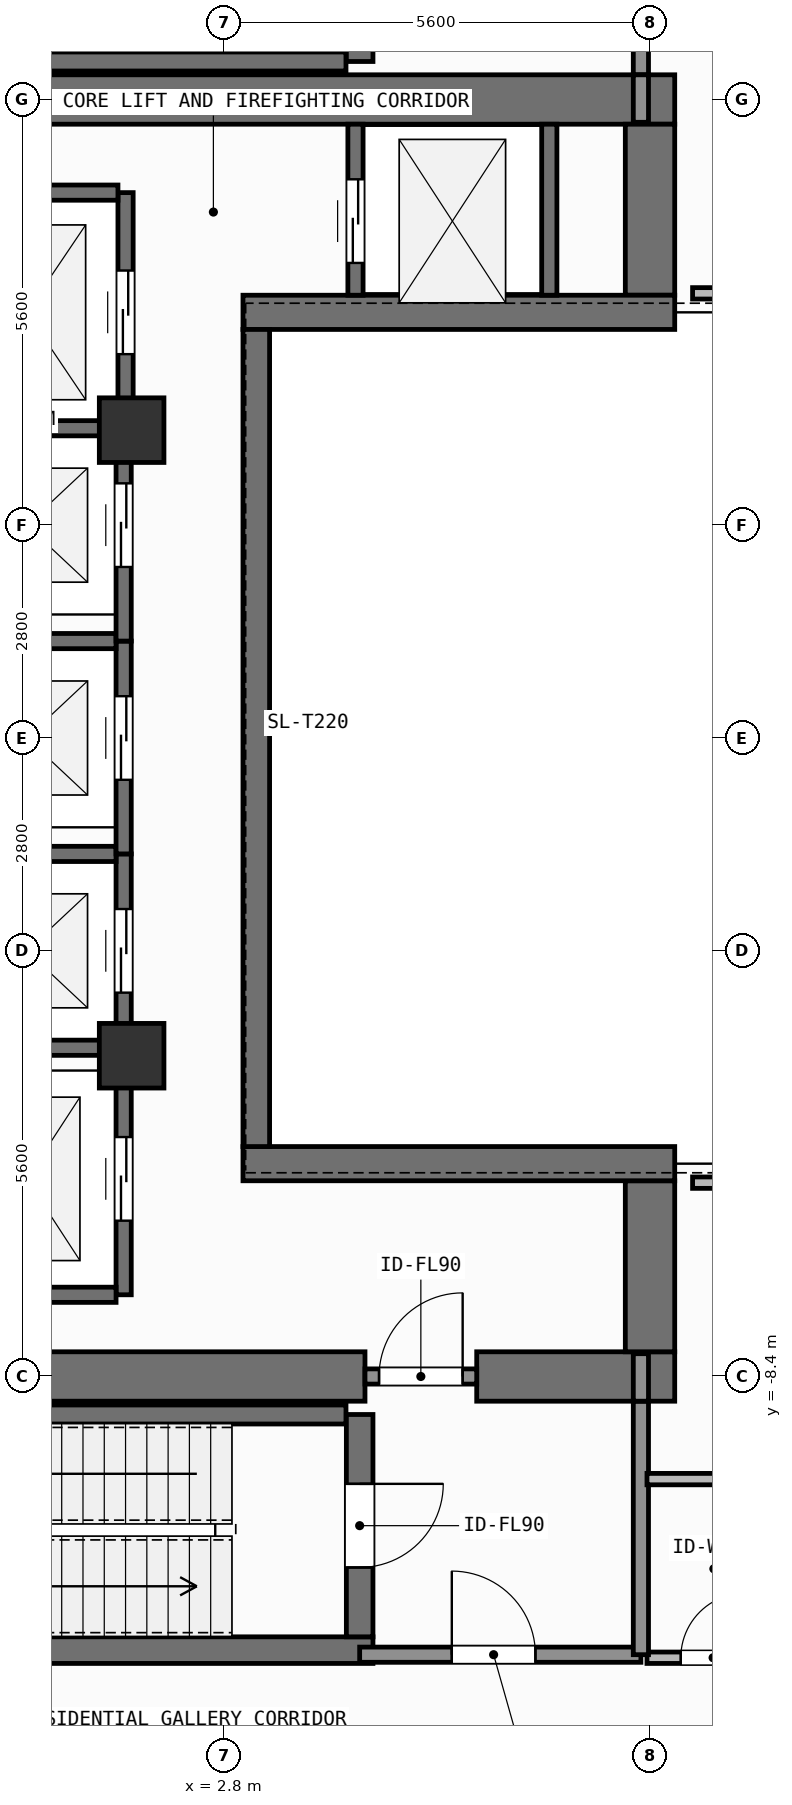
"""IFC4 building model, lengths in metres.
Left out: names, types, materials, properties, quantities, classifications, styles, units other than length and angle.
Written with IfcOpenShell. Run it as: python <this file> out.ifc"""

import sys

from ifc_helpers import new_model, si_unit, direction, frame, frame_2d, origin, origin_2d, place, context, subcontext, project, spatial, rectangle, extrude, element, fill, save


model = new_model("IFC4")
c1 = context("Model", 3, precision=1e-05, world=origin(), true_north=direction((0.0, 1.0)))
c2 = subcontext(c1, "Body", "Model", "MODEL_VIEW")
j1 = project(units=[si_unit("LENGTHUNIT", "METRE"), si_unit("PLANEANGLEUNIT", "RADIAN")], contexts=[c1])
p1 = place(None, origin())
s1 = spatial("IfcSite", under=j1, at=p1, CompositionType="ELEMENT")
p2 = place(p1, origin())
s2 = spatial("IfcBuilding", under=s1, at=p2, CompositionType="ELEMENT")
p3 = place(p2, frame((0.0, 0.0, 282.0)))
s3 = spatial("IfcBuildingStorey", under=s2, at=p3, CompositionType="ELEMENT", Elevation=282.0)
p4 = place(p3, frame((-2.62, -8.4, 0.0), z_axis=(0.0, 0.0, 1.0), x_axis=(1.0, 0.0, 0.0)))
e1 = element("IfcWall", 1, at=p4, inside=s3, PredefinedType="SHEAR", context=c2, shape_type="SweptSolid", body=[
    extrude(rectangle(XDim=7.27, YDim=0.65, at=frame_2d((3.635, 0.0))), origin(), (0.0, 0.0, 1.0), 3.9),
])
p5 = place(p3, frame((6.12, -8.4, 0.0), z_axis=(0.0, 0.0, 1.0), x_axis=(1.0, 0.0, 0.0)))
e2 = element("IfcWall", 2, at=p5, inside=s3, PredefinedType="SHEAR", context=c2, shape_type="SweptSolid", body=[
    extrude(rectangle(XDim=2.605, YDim=0.65, at=frame_2d((1.302, 0.0))), origin(), (0.0, 0.0, 1.0), 3.9),
])
p6 = place(p3, frame((-7.55, 8.4, 0.0), z_axis=(0.0, 0.0, 1.0), x_axis=(1.0, 0.0, 0.0)))
e3 = element("IfcWall", 3, at=p6, inside=s3, PredefinedType="SHEAR", context=c2, shape_type="SweptSolid", body=[
    extrude(rectangle(XDim=16.275, YDim=0.65, at=frame_2d((8.138, 0.0))), origin(), (0.0, 0.0, 1.0), 3.9),
])
for number, where, z_axis, x_axis in (
    (4, (8.4, -8.075, 0.0), (0.0, 0.0, 1.0), (0.0, 1.0, 0.0)),
    (5, (8.4, 5.825, 0.0), (0.0, 0.0, 1.0), (0.0, 1.0, 0.0)),
):
    element("IfcWall", number, at=place(p3, frame(where, z_axis=z_axis, x_axis=x_axis)), inside=s3, PredefinedType="SHEAR", context=c2, shape_type="SweptSolid", body=[
        extrude(rectangle(XDim=2.25, YDim=0.65, at=frame_2d((1.125, 0.0))), origin(), (0.0, 0.0, 1.0), 3.9),
    ])
for number, where, z_axis, x_axis in (
    (6, (3.045, -5.6, 0.0), (0.0, 0.0, 1.0), (1.0, 0.0, 0.0)),
    (7, (3.045, 5.6, 0.0), (0.0, 0.0, 1.0), (1.0, 0.0, 0.0)),
):
    element("IfcWall", number, at=place(p3, frame(where, z_axis=z_axis, x_axis=x_axis)), inside=s3, PredefinedType="SHEAR", context=c2, shape_type="SweptSolid", body=[
        extrude(rectangle(XDim=5.68, YDim=0.45, at=frame_2d((2.84, 0.0))), origin(), (0.0, 0.0, 1.0), 3.9),
    ])
p7 = place(p3, frame((3.22, -5.375, 0.0), z_axis=(0.0, 0.0, 1.0), x_axis=(0.0, 1.0, 0.0)))
e8 = element("IfcWall", 8, at=p7, inside=s3, PredefinedType="SHEAR", context=c2, shape_type="SweptSolid", body=[
    extrude(rectangle(XDim=10.75, YDim=0.35, at=frame_2d((5.375, 0.0))), origin(), (0.0, 0.0, 1.0), 3.9),
])
p8 = place(p3, frame((-2.555, -12.0, 0.0), z_axis=(0.0, 0.0, 1.0), x_axis=(1.0, 0.0, 0.0)))
e9 = element("IfcWall", 9, at=p8, inside=s3, PredefinedType="SHEAR", context=c2, shape_type="SweptSolid", body=[
    extrude(rectangle(XDim=7.31, YDim=0.35, at=frame_2d((3.655, 0.0))), origin(), (0.0, 0.0, 1.0), 3.9),
])
p9 = place(p3, frame((-2.2, -8.9, 0.0), z_axis=(0.0, 0.0, 1.0), x_axis=(1.0, 0.0, 0.0)))
e10 = element("IfcWall", 10, at=p9, inside=s3, PredefinedType="SHEAR", context=c2, shape_type="SweptSolid", body=[
    extrude(rectangle(XDim=6.6, YDim=0.25, at=frame_2d((3.3, 0.0))), origin(), (0.0, 0.0, 1.0), 3.9),
])
p10 = place(p3, frame((4.58, -8.9, 0.0), z_axis=(0.0, 0.0, 1.0), x_axis=(0.0, -1.0, 0.0)))
e11 = element("IfcWall", 11, at=p10, inside=s3, PredefinedType="SHEAR", context=c2, shape_type="SweptSolid", body=[
    extrude(rectangle(XDim=2.925, YDim=0.35, at=frame_2d((1.462, 0.0))), origin(), (0.0, 0.0, 1.0), 3.9),
])
p11 = place(p10, frame((0.913, 0.0, 0.0)))
e12 = element("IfcOpeningElement", 12, at=p11, cuts=e11, PredefinedType="OPENING", context=c2, shape_type="SweptSolid", body=[
    extrude(rectangle(XDim=1.1, YDim=2.15, at=frame_2d((0.55, 1.075))), frame((0.0, 0.185, 0.0), z_axis=(0.0, -1.0, 0.0), x_axis=(1.0, 0.0, 0.0)), (0.0, 0.0, 1.0), 0.37),
])
p12 = place(p3, frame((-2.2, 8.9, 0.0), z_axis=(0.0, 0.0, 1.0), x_axis=(1.0, 0.0, 0.0)))
e13 = element("IfcWall", 13, at=p12, inside=s3, PredefinedType="SHEAR", context=c2, shape_type="SweptSolid", body=[
    extrude(rectangle(XDim=6.6, YDim=0.25, at=frame_2d((3.3, 0.0))), origin(), (0.0, 0.0, 1.0), 3.9),
])
p13 = place(p3, frame((4.58, 11.825, 0.0), z_axis=(0.0, 0.0, 1.0), x_axis=(0.0, -1.0, 0.0)))
e14 = element("IfcWall", 14, at=p13, inside=s3, PredefinedType="SHEAR", context=c2, shape_type="SweptSolid", body=[
    extrude(rectangle(XDim=2.925, YDim=0.35, at=frame_2d((1.462, 0.0))), origin(), (0.0, 0.0, 1.0), 3.9),
])
p14 = place(p13, frame((0.913, 0.0, 0.0)))
e15 = element("IfcOpeningElement", 15, at=p14, cuts=e14, PredefinedType="OPENING", context=c2, shape_type="SweptSolid", body=[
    extrude(rectangle(XDim=1.1, YDim=2.15, at=frame_2d((0.55, 1.075))), frame((0.0, 0.185, 0.0), z_axis=(0.0, -1.0, 0.0), x_axis=(1.0, 0.0, 0.0)), (0.0, 0.0, 1.0), 0.37),
])
for number, where, z_axis, x_axis in (
    (16, (1.58, -4.18, 0.0), (0.0, 0.0, 1.0), (1.0, 0.0, 0.0)),
    (17, (1.58, 4.05, 0.0), (0.0, 0.0, 1.0), (1.0, 0.0, 0.0)),
):
    element("IfcColumn", number, at=place(p3, frame(where, z_axis=z_axis, x_axis=x_axis)), inside=s3, PredefinedType="COLUMN", context=c2, shape_type="SweptSolid", body=[
        extrude(rectangle(XDim=0.85, YDim=0.85, at=origin_2d()), origin(), (0.0, 0.0, 1.0), 3.9),
    ])
p15 = place(p3, frame((1.475, -4.275, 0.0), z_axis=(0.0, 0.0, 1.0), x_axis=(0.0, 1.0, 0.0)))
e18 = element("IfcWall", 18, at=p15, inside=s3, PredefinedType="SHEAR", context=c2, shape_type="SweptSolid", body=[
    extrude(rectangle(XDim=2.75, YDim=0.2, at=frame_2d((1.375, 0.0))), origin(), (0.0, 0.0, 1.0), 3.62),
])
p16 = place(p15, frame((0.925, 0.0, 0.0)))
e19 = element("IfcOpeningElement", 19, at=p16, cuts=e18, PredefinedType="OPENING", context=c2, shape_type="SweptSolid", body=[
    extrude(rectangle(XDim=1.1, YDim=2.2, at=frame_2d((0.55, 1.1))), frame((0.0, 0.11, 0.0), z_axis=(0.0, -1.0, 0.0), x_axis=(1.0, 0.0, 0.0)), (0.0, 0.0, 1.0), 0.22),
])
for number, where, z_axis, x_axis in (
    (20, (-0.975, -4.075, 0.0), (0.0, 0.0, 1.0), (1.0, 0.0, 0.0)),
    (21, (-0.975, -1.525, 0.0), (0.0, 0.0, 1.0), (1.0, 0.0, 0.0)),
):
    element("IfcWall", number, at=place(p3, frame(where, z_axis=z_axis, x_axis=x_axis)), inside=s3, PredefinedType="SHEAR", context=c2, shape_type="SweptSolid", body=[
        extrude(rectangle(XDim=2.35, YDim=0.2, at=frame_2d((1.175, 0.0))), origin(), (0.0, 0.0, 1.0), 3.62),
    ])
p17 = place(p3, frame((1.475, -1.525, 0.0), z_axis=(0.0, 0.0, 1.0), x_axis=(0.0, 1.0, 0.0)))
e22 = element("IfcWall", 22, at=p17, inside=s3, PredefinedType="SHEAR", context=c2, shape_type="SweptSolid", body=[
    extrude(rectangle(XDim=2.8, YDim=0.2, at=frame_2d((1.4, 0.0))), origin(), (0.0, 0.0, 1.0), 3.62),
])
p18 = place(p17, frame((0.975, 0.0, 0.0)))
e23 = element("IfcOpeningElement", 23, at=p18, cuts=e22, PredefinedType="OPENING", context=c2, shape_type="SweptSolid", body=[
    extrude(rectangle(XDim=1.1, YDim=2.2, at=frame_2d((0.55, 1.1))), frame((0.0, 0.11, 0.0), z_axis=(0.0, -1.0, 0.0), x_axis=(1.0, 0.0, 0.0)), (0.0, 0.0, 1.0), 0.22),
])
p19 = place(p3, frame((-0.975, 1.275, 0.0), z_axis=(0.0, 0.0, 1.0), x_axis=(1.0, 0.0, 0.0)))
e24 = element("IfcWall", 24, at=p19, inside=s3, PredefinedType="SHEAR", context=c2, shape_type="SweptSolid", body=[
    extrude(rectangle(XDim=2.35, YDim=0.2, at=frame_2d((1.175, 0.0))), origin(), (0.0, 0.0, 1.0), 3.62),
])
p20 = place(p3, frame((1.475, 1.275, 0.0), z_axis=(0.0, 0.0, 1.0), x_axis=(0.0, 1.0, 0.0)))
e25 = element("IfcWall", 25, at=p20, inside=s3, PredefinedType="SHEAR", context=c2, shape_type="SweptSolid", body=[
    extrude(rectangle(XDim=2.8, YDim=0.2, at=frame_2d((1.4, 0.0))), origin(), (0.0, 0.0, 1.0), 3.62),
])
p21 = place(p20, frame((0.975, 0.0, 0.0)))
e26 = element("IfcOpeningElement", 26, at=p21, cuts=e25, PredefinedType="OPENING", context=c2, shape_type="SweptSolid", body=[
    extrude(rectangle(XDim=1.1, YDim=2.2, at=frame_2d((0.55, 1.1))), frame((0.0, 0.11, 0.0), z_axis=(0.0, -1.0, 0.0), x_axis=(1.0, 0.0, 0.0)), (0.0, 0.0, 1.0), 0.22),
])
p22 = place(p3, frame((-0.975, 4.075, 0.0), z_axis=(0.0, 0.0, 1.0), x_axis=(1.0, 0.0, 0.0)))
e27 = element("IfcWall", 27, at=p22, inside=s3, PredefinedType="SHEAR", context=c2, shape_type="SweptSolid", body=[
    extrude(rectangle(XDim=2.35, YDim=0.2, at=frame_2d((1.175, 0.0))), origin(), (0.0, 0.0, 1.0), 3.62),
])
p23 = place(p3, frame((1.5, 4.025, 0.0), z_axis=(0.0, 0.0, 1.0), x_axis=(0.0, 1.0, 0.0)))
e28 = element("IfcWall", 28, at=p23, inside=s3, PredefinedType="SHEAR", context=c2, shape_type="SweptSolid", body=[
    extrude(rectangle(XDim=3.15, YDim=0.2, at=frame_2d((1.575, 0.0))), origin(), (0.0, 0.0, 1.0), 3.62),
])
p24 = place(p23, frame((1.025, 0.0, 0.0)))
e29 = element("IfcOpeningElement", 29, at=p24, cuts=e28, PredefinedType="OPENING", context=c2, shape_type="SweptSolid", body=[
    extrude(rectangle(XDim=1.1, YDim=2.2, at=frame_2d((0.55, 1.1))), frame((0.0, 0.11, 0.0), z_axis=(0.0, -1.0, 0.0), x_axis=(1.0, 0.0, 0.0)), (0.0, 0.0, 1.0), 0.22),
])
p25 = place(p3, frame((-1.0, 7.175, 0.0), z_axis=(0.0, 0.0, 1.0), x_axis=(1.0, 0.0, 0.0)))
e30 = element("IfcWall", 30, at=p25, inside=s3, PredefinedType="SHEAR", context=c2, shape_type="SweptSolid", body=[
    extrude(rectangle(XDim=2.4, YDim=0.2, at=frame_2d((1.2, 0.0))), origin(), (0.0, 0.0, 1.0), 3.62),
])
p26 = place(p3, frame((1.475, -7.325, 0.0), z_axis=(0.0, 0.0, 1.0), x_axis=(0.0, 1.0, 0.0)))
e31 = element("IfcWall", 31, at=p26, inside=s3, PredefinedType="SHEAR", context=c2, shape_type="SweptSolid", body=[
    extrude(rectangle(XDim=3.05, YDim=0.2, at=frame_2d((1.525, 0.0))), origin(), (0.0, 0.0, 1.0), 3.62),
])
p27 = place(p26, frame((0.975, 0.0, 0.0)))
e32 = element("IfcOpeningElement", 32, at=p27, cuts=e31, PredefinedType="OPENING", context=c2, shape_type="SweptSolid", body=[
    extrude(rectangle(XDim=1.1, YDim=2.2, at=frame_2d((0.55, 1.1))), frame((0.0, 0.11, 0.0), z_axis=(0.0, -1.0, 0.0), x_axis=(1.0, 0.0, 0.0)), (0.0, 0.0, 1.0), 0.22),
])
p28 = place(p3, frame((-0.975, -7.325, 0.0), z_axis=(0.0, 0.0, 1.0), x_axis=(1.0, 0.0, 0.0)))
e33 = element("IfcWall", 33, at=p28, inside=s3, PredefinedType="SHEAR", context=c2, shape_type="SweptSolid", body=[
    extrude(rectangle(XDim=2.35, YDim=0.2, at=frame_2d((1.175, 0.0))), origin(), (0.0, 0.0, 1.0), 3.62),
])
p29 = place(p3, frame((4.525, 5.825, 0.0), z_axis=(0.0, 0.0, 1.0), x_axis=(0.0, 1.0, 0.0)))
e34 = element("IfcWall", 34, at=p29, inside=s3, PredefinedType="SHEAR", context=c2, shape_type="SweptSolid", body=[
    extrude(rectangle(XDim=2.25, YDim=0.2, at=frame_2d((1.125, 0.0))), origin(), (0.0, 0.0, 1.0), 3.62),
])
p30 = place(p29, frame((0.425, 0.0, 0.0)))
e35 = element("IfcOpeningElement", 35, at=p30, cuts=e34, PredefinedType="OPENING", context=c2, shape_type="SweptSolid", body=[
    extrude(rectangle(XDim=1.1, YDim=2.2, at=frame_2d((0.55, 1.1))), frame((0.0, 0.11, 0.0), z_axis=(0.0, -1.0, 0.0), x_axis=(1.0, 0.0, 0.0)), (0.0, 0.0, 1.0), 0.22),
])
p31 = place(p3, frame((7.075, 5.825, 0.0), z_axis=(0.0, 0.0, 1.0), x_axis=(0.0, 1.0, 0.0)))
e36 = element("IfcWall", 36, at=p31, inside=s3, PredefinedType="SHEAR", context=c2, shape_type="SweptSolid", body=[
    extrude(rectangle(XDim=2.25, YDim=0.2, at=frame_2d((1.125, 0.0))), origin(), (0.0, 0.0, 1.0), 3.62),
])
p32 = place(p3, frame((4.58, -12.06, 0.0), z_axis=(0.0, 0.0, 1.0), x_axis=(1.0, 0.0, 0.0)))
e37 = element("IfcWall", 37, at=p32, inside=s3, PredefinedType="SOLIDWALL", context=c2, shape_type="SweptSolid", body=[
    extrude(rectangle(XDim=3.7, YDim=0.2, at=frame_2d((1.85, 0.0))), origin(), (0.0, 0.0, 1.0), 3.62),
])
p33 = place(p32, frame((1.212, 0.0, 0.0)))
e38 = element("IfcOpeningElement", 38, at=p33, cuts=e37, PredefinedType="OPENING", context=c2, shape_type="SweptSolid", body=[
    extrude(rectangle(XDim=1.1, YDim=2.15, at=frame_2d((0.55, 1.075))), frame((0.0, 0.11, 0.0), z_axis=(0.0, -1.0, 0.0), x_axis=(1.0, 0.0, 0.0)), (0.0, 0.0, 1.0), 0.22),
])
p34 = place(p3, frame((4.65, -8.4, 0.0), z_axis=(0.0, 0.0, 1.0), x_axis=(1.0, 0.0, 0.0)))
e39 = element("IfcWall", 39, at=p34, inside=s3, PredefinedType="SOLIDWALL", context=c2, shape_type="SweptSolid", body=[
    extrude(rectangle(XDim=1.47, YDim=0.2, at=frame_2d((0.735, 0.0))), origin(), (0.0, 0.0, 1.0), 2.86),
])
p35 = place(p34, frame((0.185, 0.0, 0.0)))
e40 = element("IfcOpeningElement", 40, at=p35, cuts=e39, PredefinedType="OPENING", context=c2, shape_type="SweptSolid", body=[
    extrude(rectangle(XDim=1.1, YDim=2.15, at=frame_2d((0.55, 1.075))), frame((0.0, 0.11, 0.0), z_axis=(0.0, -1.0, 0.0), x_axis=(1.0, 0.0, 0.0)), (0.0, 0.0, 1.0), 0.22),
])
p36 = place(p3, frame((8.36, -12.1, 0.0), z_axis=(0.0, 0.0, 1.0), x_axis=(1.0, 0.0, 0.0)))
e41 = element("IfcWall", 41, at=p36, inside=s3, PredefinedType="PARTITIONING", context=c2, shape_type="SweptSolid", body=[
    extrude(rectangle(XDim=1.74, YDim=0.15, at=frame_2d((0.87, 0.0))), origin(), (0.0, 0.0, 1.0), 3.62),
])
p37 = place(p36, frame((0.445, 0.0, 0.0)))
e42 = element("IfcOpeningElement", 42, at=p37, cuts=e41, PredefinedType="OPENING", context=c2, shape_type="SweptSolid", body=[
    extrude(rectangle(XDim=0.85, YDim=2.1, at=frame_2d((0.425, 1.05))), frame((0.0, 0.085, 0.0), z_axis=(0.0, -1.0, 0.0), x_axis=(1.0, 0.0, 0.0)), (0.0, 0.0, 1.0), 0.17),
])
for number, where, z_axis, x_axis in (
    (43, (8.28, -12.06, 0.0), (0.0, 0.0, 1.0), (0.0, 1.0, 0.0)),
    (44, (8.28, 8.725, 0.0), (0.0, 0.0, 1.0), (0.0, 1.0, 0.0)),
):
    element("IfcWall", number, at=place(p3, frame(where, z_axis=z_axis, x_axis=x_axis)), inside=s3, PredefinedType="SOLIDWALL", context=c2, shape_type="SweptSolid", body=[
        extrude(rectangle(XDim=3.335, YDim=0.2, at=frame_2d((1.667, 0.0))), origin(), (0.0, 0.0, 1.0), 3.62),
    ])
p38 = place(p3, frame((8.28, -8.725, 0.0), z_axis=(0.0, 0.0, 1.0), x_axis=(0.0, 1.0, 0.0)))
e45 = element("IfcWall", 45, at=p38, inside=s3, PredefinedType="SOLIDWALL", context=c2, shape_type="SweptSolid", body=[
    extrude(rectangle(XDim=0.625, YDim=0.2, at=frame_2d((0.312, 0.0))), origin(), (0.0, 0.0, 1.0), 3.62),
])
p39 = place(p3, frame((8.36, -9.75, 0.0), z_axis=(0.0, 0.0, 1.0), x_axis=(1.0, 0.0, 0.0)))
e46 = element("IfcWall", 46, at=p39, inside=s3, PredefinedType="PARTITIONING", context=c2, shape_type="SweptSolid", body=[
    extrude(rectangle(XDim=1.74, YDim=0.15, at=frame_2d((0.87, 0.0))), origin(), (0.0, 0.0, 1.0), 3.62),
])
p40 = place(p3, frame((8.96, -5.85, 0.0), z_axis=(0.0, 0.0, 1.0), x_axis=(1.0, 0.0, 0.0)))
e47 = element("IfcWall", 47, at=p40, inside=s3, PredefinedType="PARTITIONING", context=c2, shape_type="SweptSolid", body=[
    extrude(rectangle(XDim=6.62, YDim=0.15, at=frame_2d((3.31, 0.0))), origin(), (0.0, 0.0, 1.0), 3.62),
])
p41 = place(p3, frame((8.28, 8.1, 0.0), z_axis=(0.0, 0.0, 1.0), x_axis=(0.0, 1.0, 0.0)))
e48 = element("IfcWall", 48, at=p41, inside=s3, PredefinedType="SOLIDWALL", context=c2, shape_type="SweptSolid", body=[
    extrude(rectangle(XDim=0.625, YDim=0.2, at=frame_2d((0.312, 0.0))), origin(), (0.0, 0.0, 1.0), 3.62),
])
p42 = place(p3, frame((8.96, 5.85, 0.0), z_axis=(0.0, 0.0, 1.0), x_axis=(1.0, 0.0, 0.0)))
e49 = element("IfcWall", 49, at=p42, inside=s3, PredefinedType="PARTITIONING", context=c2, shape_type="SweptSolid", body=[
    extrude(rectangle(XDim=6.62, YDim=0.15, at=frame_2d((3.31, 0.0))), origin(), (0.0, 0.0, 1.0), 3.62),
])
p43 = place(p16, origin())
e50 = element("IfcDoor", 50, at=p43, inside=s3, OperationType="SLIDING_TO_LEFT", PredefinedType="DOOR", context=c2, shape_type="SweptSolid", body=[
    extrude(rectangle(XDim=1.1, YDim=2.2, at=frame_2d((0.55, 1.1))), frame((0.0, 0.025, 0.0), z_axis=(0.0, -1.0, 0.0), x_axis=(1.0, 0.0, 0.0)), (0.0, 0.0, 1.0), 0.05),
])
fill(e19, e50)
p44 = place(p18, origin())
e51 = element("IfcDoor", 51, at=p44, inside=s3, OperationType="SLIDING_TO_LEFT", PredefinedType="DOOR", context=c2, shape_type="SweptSolid", body=[
    extrude(rectangle(XDim=1.1, YDim=2.2, at=frame_2d((0.55, 1.1))), frame((0.0, 0.025, 0.0), z_axis=(0.0, -1.0, 0.0), x_axis=(1.0, 0.0, 0.0)), (0.0, 0.0, 1.0), 0.05),
])
fill(e23, e51)
p45 = place(p21, origin())
e52 = element("IfcDoor", 52, at=p45, inside=s3, OperationType="SLIDING_TO_LEFT", PredefinedType="DOOR", context=c2, shape_type="SweptSolid", body=[
    extrude(rectangle(XDim=1.1, YDim=2.2, at=frame_2d((0.55, 1.1))), frame((0.0, 0.025, 0.0), z_axis=(0.0, -1.0, 0.0), x_axis=(1.0, 0.0, 0.0)), (0.0, 0.0, 1.0), 0.05),
])
fill(e26, e52)
p46 = place(p24, origin())
e53 = element("IfcDoor", 53, at=p46, inside=s3, OperationType="SLIDING_TO_LEFT", PredefinedType="DOOR", context=c2, shape_type="SweptSolid", body=[
    extrude(rectangle(XDim=1.1, YDim=2.2, at=frame_2d((0.55, 1.1))), frame((0.0, 0.025, 0.0), z_axis=(0.0, -1.0, 0.0), x_axis=(1.0, 0.0, 0.0)), (0.0, 0.0, 1.0), 0.05),
])
fill(e29, e53)
p47 = place(p27, origin())
e54 = element("IfcDoor", 54, at=p47, inside=s3, OperationType="SLIDING_TO_LEFT", PredefinedType="DOOR", context=c2, shape_type="SweptSolid", body=[
    extrude(rectangle(XDim=1.1, YDim=2.2, at=frame_2d((0.55, 1.1))), frame((0.0, 0.025, 0.0), z_axis=(0.0, -1.0, 0.0), x_axis=(1.0, 0.0, 0.0)), (0.0, 0.0, 1.0), 0.05),
])
fill(e32, e54)
p48 = place(p30, origin())
e55 = element("IfcDoor", 55, at=p48, inside=s3, OperationType="SLIDING_TO_LEFT", PredefinedType="DOOR", context=c2, shape_type="SweptSolid", body=[
    extrude(rectangle(XDim=1.1, YDim=2.2, at=frame_2d((0.55, 1.1))), frame((0.0, 0.025, 0.0), z_axis=(0.0, -1.0, 0.0), x_axis=(1.0, 0.0, 0.0)), (0.0, 0.0, 1.0), 0.05),
])
fill(e35, e55)
p49 = place(p11, origin())
e56 = element("IfcDoor", 56, at=p49, inside=s3, OperationType="SINGLE_SWING_LEFT", PredefinedType="DOOR", context=c2, shape_type="SweptSolid", body=[
    extrude(rectangle(XDim=1.1, YDim=2.15, at=frame_2d((0.55, 1.075))), frame((0.0, 0.025, 0.0), z_axis=(0.0, -1.0, 0.0), x_axis=(1.0, 0.0, 0.0)), (0.0, 0.0, 1.0), 0.05),
])
fill(e12, e56)
p50 = place(p33, origin())
e57 = element("IfcDoor", 57, at=p50, inside=s3, OperationType="SINGLE_SWING_LEFT", PredefinedType="DOOR", context=c2, shape_type="SweptSolid", body=[
    extrude(rectangle(XDim=1.1, YDim=2.15, at=frame_2d((0.55, 1.075))), frame((0.0, 0.025, 0.0), z_axis=(0.0, -1.0, 0.0), x_axis=(1.0, 0.0, 0.0)), (0.0, 0.0, 1.0), 0.05),
])
fill(e38, e57)
p51 = place(p35, origin())
e58 = element("IfcDoor", 58, at=p51, inside=s3, OperationType="SINGLE_SWING_RIGHT", PredefinedType="DOOR", context=c2, shape_type="SweptSolid", body=[
    extrude(rectangle(XDim=1.1, YDim=2.15, at=frame_2d((0.55, 1.075))), frame((0.0, 0.025, 0.0), z_axis=(0.0, -1.0, 0.0), x_axis=(1.0, 0.0, 0.0)), (0.0, 0.0, 1.0), 0.05),
])
fill(e40, e58)
p52 = place(p37, origin())
e59 = element("IfcDoor", 59, at=p52, inside=s3, OperationType="SINGLE_SWING_RIGHT", PredefinedType="DOOR", context=c2, shape_type="SweptSolid", body=[
    extrude(rectangle(XDim=0.85, YDim=2.1, at=frame_2d((0.425, 1.05))), frame((0.0, 0.025, 0.0), z_axis=(0.0, -1.0, 0.0), x_axis=(1.0, 0.0, 0.0)), (0.0, 0.0, 1.0), 0.05),
])
fill(e42, e59)
save(model, sys.argv[1])
